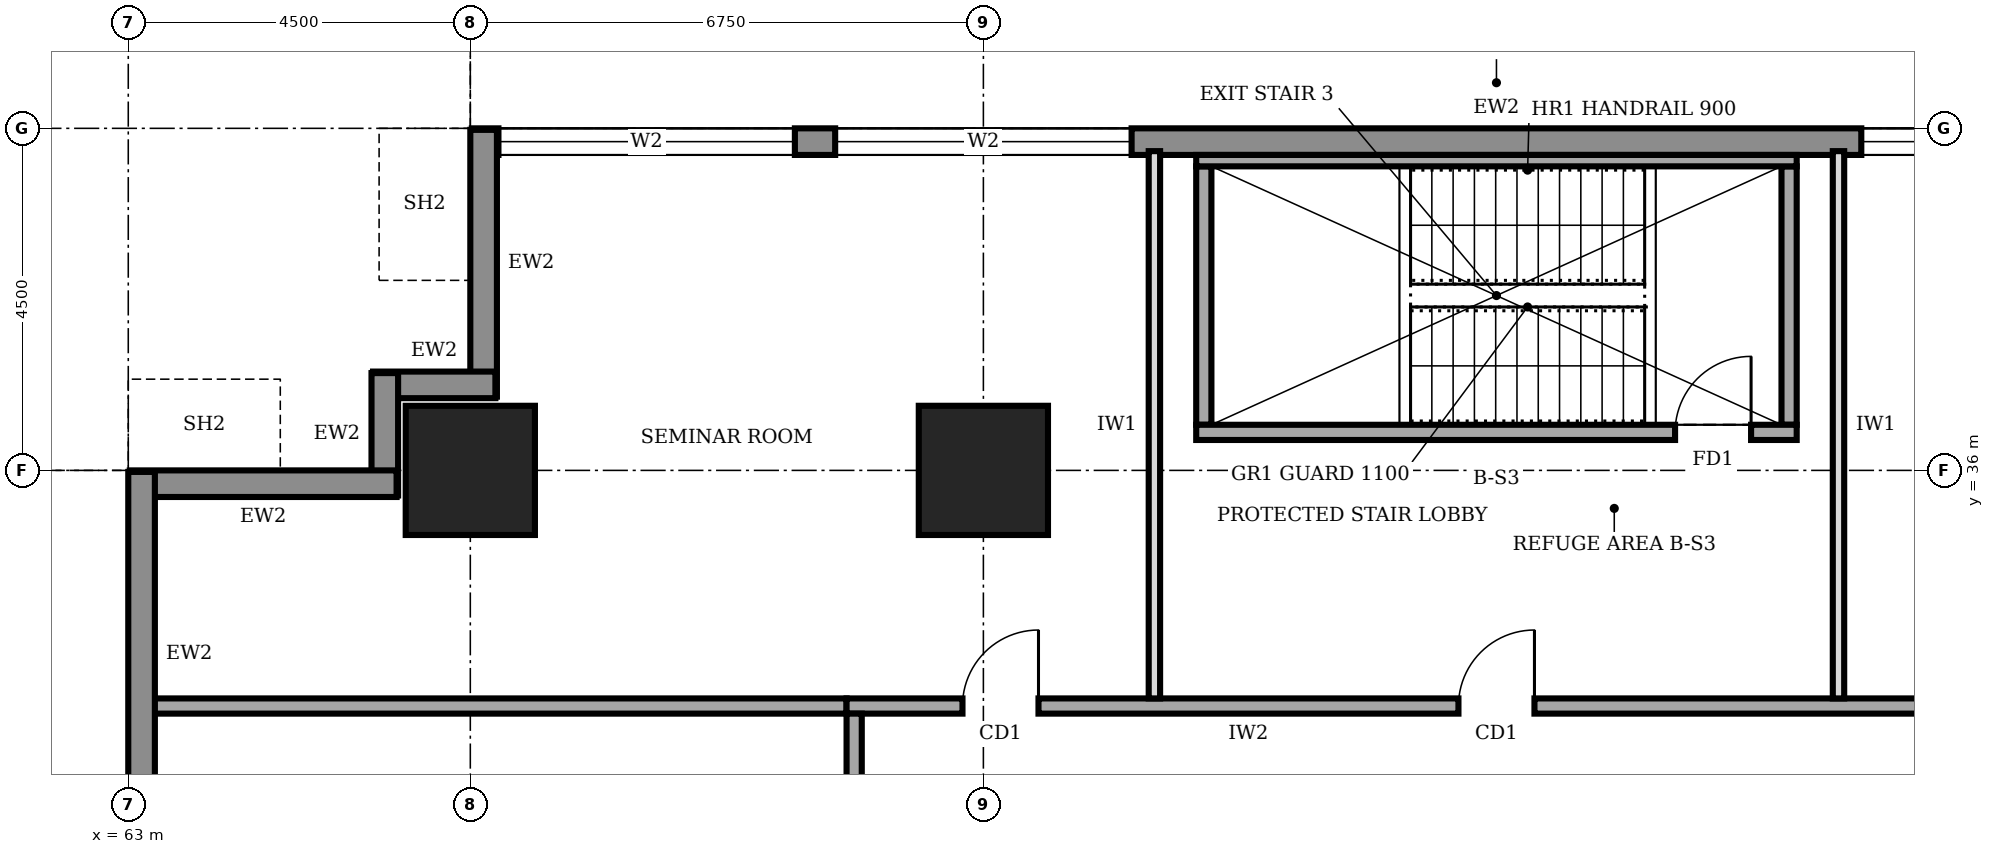
"""IFC4 building model, lengths in metres.
Left out: names, types, materials, properties, quantities, classifications, styles, units other than length and angle.
Written with IfcOpenShell. Run it as: python <this file> out.ifc"""

import sys

from ifc_helpers import new_model, si_unit, direction, frame, frame_2d, origin, origin_2d, place, context, subcontext, project, spatial, rectangle, extrude, element, fill, save


model = new_model("IFC4")
c1 = context("Model", 3, precision=1e-05, world=origin(), true_north=direction((0.0, 1.0)))
c2 = subcontext(c1, "Body", "Model", "MODEL_VIEW")
j1 = project(units=[si_unit("LENGTHUNIT", "METRE"), si_unit("PLANEANGLEUNIT", "RADIAN")], contexts=[c1])
p1 = place(None, origin())
s1 = spatial("IfcSite", under=j1, at=p1, CompositionType="ELEMENT")
p2 = place(p1, origin())
s2 = spatial("IfcBuilding", under=s1, at=p2, CompositionType="ELEMENT")
p3 = place(p2, frame((0.0, 0.0, 61.0)))
s3 = spatial("IfcBuildingStorey", under=s2, at=p3, CompositionType="ELEMENT", Elevation=61.0)
for number, where, z_axis, x_axis in (
    (1, (67.5, 36.0, 0.0), (0.0, 0.0, 1.0), (1.0, 0.0, 0.0)),
    (2, (74.25, 36.0, 0.0), (0.0, 0.0, 1.0), (1.0, 0.0, 0.0)),
):
    element("IfcColumn", number, at=place(p3, frame(where, z_axis=z_axis, x_axis=x_axis)), inside=s3, PredefinedType="COLUMN", context=c2, shape_type="SweptSolid", body=[
        extrude(rectangle(XDim=1.7, YDim=1.7, at=origin_2d()), origin(), (0.0, 0.0, 1.0), 4.0),
    ])
p4 = place(p3, frame((94.48, 40.325, 0.0), z_axis=(0.0, 0.0, 1.0), x_axis=(-1.0, 0.0, 0.0)))
e3 = element("IfcWall", 3, at=p4, inside=s3, PredefinedType="STANDARD", context=c2, shape_type="SweptSolid", body=[
    extrude(rectangle(XDim=26.96, YDim=0.35, at=frame_2d((13.48, 0.0))), origin(), (0.0, 0.0, 1.0), 3.75),
])
p5 = place(p4, frame((22.71, 0.0, 0.6)))
e4 = element("IfcOpeningElement", 4, at=p5, cuts=e3, PredefinedType="OPENING", context=c2, shape_type="SweptSolid", body=[
    extrude(rectangle(XDim=3.9, YDim=2.6, at=frame_2d((1.95, 1.3))), frame((0.0, 0.185, 0.0), z_axis=(0.0, -1.0, 0.0), x_axis=(1.0, 0.0, 0.0)), (0.0, 0.0, 1.0), 0.37),
])
p6 = place(p4, frame((18.28, 0.0, 0.6)))
e5 = element("IfcOpeningElement", 5, at=p6, cuts=e3, PredefinedType="OPENING", context=c2, shape_type="SweptSolid", body=[
    extrude(rectangle(XDim=3.9, YDim=2.6, at=frame_2d((1.95, 1.3))), frame((0.0, 0.185, 0.0), z_axis=(0.0, -1.0, 0.0), x_axis=(1.0, 0.0, 0.0)), (0.0, 0.0, 1.0), 0.37),
])
p7 = place(p4, frame((4.78, 0.0, 0.6)))
e6 = element("IfcOpeningElement", 6, at=p7, cuts=e3, PredefinedType="OPENING", context=c2, shape_type="SweptSolid", body=[
    extrude(rectangle(XDim=3.9, YDim=2.6, at=frame_2d((1.95, 1.3))), frame((0.0, 0.185, 0.0), z_axis=(0.0, -1.0, 0.0), x_axis=(1.0, 0.0, 0.0)), (0.0, 0.0, 1.0), 0.37),
])
p8 = place(p3, frame((67.675, 40.48, 0.0), z_axis=(0.0, 0.0, 1.0), x_axis=(0.0, -1.0, 0.0)))
e7 = element("IfcWall", 7, at=p8, inside=s3, PredefinedType="STANDARD", context=c2, shape_type="SweptSolid", body=[
    extrude(rectangle(XDim=3.51, YDim=0.35, at=frame_2d((1.755, 0.0))), origin(), (0.0, 0.0, 1.0), 2.85),
])
for number, where, z_axis, x_axis in (
    (8, (67.83, 37.125, 0.0), (0.0, 0.0, 1.0), (-1.0, 0.0, 0.0)),
    (9, (66.375, 37.28, 0.0), (0.0, 0.0, 1.0), (0.0, -1.0, 0.0)),
):
    element("IfcWall", number, at=place(p3, frame(where, z_axis=z_axis, x_axis=x_axis)), inside=s3, PredefinedType="STANDARD", context=c2, shape_type="SweptSolid", body=[
        extrude(rectangle(XDim=1.61, YDim=0.35, at=frame_2d((0.805, 0.0))), origin(), (0.0, 0.0, 1.0), 3.75),
    ])
p9 = place(p3, frame((66.53, 35.825, 0.0), z_axis=(0.0, 0.0, 1.0), x_axis=(-1.0, 0.0, 0.0)))
e10 = element("IfcWall", 10, at=p9, inside=s3, PredefinedType="STANDARD", context=c2, shape_type="SweptSolid", body=[
    extrude(rectangle(XDim=3.51, YDim=0.35, at=frame_2d((1.755, 0.0))), origin(), (0.0, 0.0, 1.0), 2.85),
])
p10 = place(p3, frame((63.175, 35.98, 0.0), z_axis=(0.0, 0.0, 1.0), x_axis=(0.0, -1.0, 0.0)))
e11 = element("IfcWall", 11, at=p10, inside=s3, PredefinedType="STANDARD", context=c2, shape_type="SweptSolid", body=[
    extrude(rectangle(XDim=31.46, YDim=0.35, at=frame_2d((15.73, 0.0))), origin(), (0.0, 0.0, 1.0), 3.75),
])
p11 = place(p10, frame((27.21, 0.0, 0.6)))
e12 = element("IfcOpeningElement", 12, at=p11, cuts=e11, PredefinedType="OPENING", context=c2, shape_type="SweptSolid", body=[
    extrude(rectangle(XDim=3.9, YDim=2.6, at=frame_2d((1.95, 1.3))), frame((0.0, 0.185, 0.0), z_axis=(0.0, -1.0, 0.0), x_axis=(1.0, 0.0, 0.0)), (0.0, 0.0, 1.0), 0.37),
])
p12 = place(p10, frame((22.78, 0.0, 0.6)))
e13 = element("IfcOpeningElement", 13, at=p12, cuts=e11, PredefinedType="OPENING", context=c2, shape_type="SweptSolid", body=[
    extrude(rectangle(XDim=3.9, YDim=2.6, at=frame_2d((1.95, 1.3))), frame((0.0, 0.185, 0.0), z_axis=(0.0, -1.0, 0.0), x_axis=(1.0, 0.0, 0.0)), (0.0, 0.0, 1.0), 0.37),
])
p13 = place(p10, frame((18.28, 0.0, 0.6)))
e14 = element("IfcOpeningElement", 14, at=p13, cuts=e11, PredefinedType="OPENING", context=c2, shape_type="SweptSolid", body=[
    extrude(rectangle(XDim=3.9, YDim=2.6, at=frame_2d((1.95, 1.3))), frame((0.0, 0.185, 0.0), z_axis=(0.0, -1.0, 0.0), x_axis=(1.0, 0.0, 0.0)), (0.0, 0.0, 1.0), 0.37),
])
p14 = place(p10, frame((13.78, 0.0, 0.6)))
e15 = element("IfcOpeningElement", 15, at=p14, cuts=e11, PredefinedType="OPENING", context=c2, shape_type="SweptSolid", body=[
    extrude(rectangle(XDim=3.9, YDim=2.6, at=frame_2d((1.95, 1.3))), frame((0.0, 0.185, 0.0), z_axis=(0.0, -1.0, 0.0), x_axis=(1.0, 0.0, 0.0)), (0.0, 0.0, 1.0), 0.37),
])
p15 = place(p10, frame((9.28, 0.0, 0.6)))
e16 = element("IfcOpeningElement", 16, at=p15, cuts=e11, PredefinedType="OPENING", context=c2, shape_type="SweptSolid", body=[
    extrude(rectangle(XDim=3.9, YDim=2.6, at=frame_2d((1.95, 1.3))), frame((0.0, 0.185, 0.0), z_axis=(0.0, -1.0, 0.0), x_axis=(1.0, 0.0, 0.0)), (0.0, 0.0, 1.0), 0.37),
])
p16 = place(p10, frame((4.78, 0.0, 0.6)))
e17 = element("IfcOpeningElement", 17, at=p16, cuts=e11, PredefinedType="OPENING", context=c2, shape_type="SweptSolid", body=[
    extrude(rectangle(XDim=3.9, YDim=2.6, at=frame_2d((1.95, 1.3))), frame((0.0, 0.185, 0.0), z_axis=(0.0, -1.0, 0.0), x_axis=(1.0, 0.0, 0.0)), (0.0, 0.0, 1.0), 0.37),
])
p17 = place(p3, frame((89.35, 32.9, 0.0), z_axis=(0.0, 0.0, 1.0), x_axis=(-1.0, 0.0, 0.0)))
e18 = element("IfcWall", 18, at=p17, inside=s3, PredefinedType="SOLIDWALL", context=c2, shape_type="SweptSolid", body=[
    extrude(rectangle(XDim=16.9, YDim=0.2, at=frame_2d((8.45, 0.0))), origin(), (0.0, 0.0, 1.0), 3.75),
])
p18 = place(p17, frame((14.375, 0.0, 0.0)))
e19 = element("IfcOpeningElement", 19, at=p18, cuts=e18, PredefinedType="OPENING", context=c2, shape_type="SweptSolid", body=[
    extrude(rectangle(XDim=1.0, YDim=2.1, at=frame_2d((0.5, 1.05))), frame((0.0, 0.11, 0.0), z_axis=(0.0, -1.0, 0.0), x_axis=(1.0, 0.0, 0.0)), (0.0, 0.0, 1.0), 0.22),
])
p19 = place(p17, frame((7.85, 0.0, 0.0)))
e20 = element("IfcOpeningElement", 20, at=p19, cuts=e18, PredefinedType="OPENING", context=c2, shape_type="SweptSolid", body=[
    extrude(rectangle(XDim=1.0, YDim=2.1, at=frame_2d((0.5, 1.05))), frame((0.0, 0.11, 0.0), z_axis=(0.0, -1.0, 0.0), x_axis=(1.0, 0.0, 0.0)), (0.0, 0.0, 1.0), 0.22),
])
p20 = place(p17, frame((1.325, 0.0, 0.0)))
e21 = element("IfcOpeningElement", 21, at=p20, cuts=e18, PredefinedType="OPENING", context=c2, shape_type="SweptSolid", body=[
    extrude(rectangle(XDim=1.0, YDim=2.1, at=frame_2d((0.5, 1.05))), frame((0.0, 0.11, 0.0), z_axis=(0.0, -1.0, 0.0), x_axis=(1.0, 0.0, 0.0)), (0.0, 0.0, 1.0), 0.22),
])
p21 = place(p3, frame((72.55, 32.8, 0.0), z_axis=(0.0, 0.0, 1.0), x_axis=(0.0, -1.0, 0.0)))
e22 = element("IfcWall", 22, at=p21, inside=s3, PredefinedType="SOLIDWALL", context=c2, shape_type="SweptSolid", body=[
    extrude(rectangle(XDim=25.3, YDim=0.2, at=frame_2d((12.65, 0.0))), origin(), (0.0, 0.0, 1.0), 3.75),
])
p22 = place(p21, frame((19.55, 0.0, 0.0)))
e23 = element("IfcOpeningElement", 23, at=p22, cuts=e22, PredefinedType="OPENING", context=c2, shape_type="SweptSolid", body=[
    extrude(rectangle(XDim=1.0, YDim=2.1, at=frame_2d((0.5, 1.05))), frame((0.0, 0.11, 0.0), z_axis=(0.0, -1.0, 0.0), x_axis=(1.0, 0.0, 0.0)), (0.0, 0.0, 1.0), 0.22),
])
p23 = place(p21, frame((6.4, 0.0, 0.0)))
e24 = element("IfcOpeningElement", 24, at=p23, cuts=e22, PredefinedType="OPENING", context=c2, shape_type="SweptSolid", body=[
    extrude(rectangle(XDim=1.8, YDim=2.1, at=frame_2d((0.9, 1.05))), frame((0.0, 0.11, 0.0), z_axis=(0.0, -1.0, 0.0), x_axis=(1.0, 0.0, 0.0)), (0.0, 0.0, 1.0), 0.22),
])
p24 = place(p3, frame((63.3, 32.9, 0.0), z_axis=(0.0, 0.0, 1.0), x_axis=(1.0, 0.0, 0.0)))
e25 = element("IfcWall", 25, at=p24, inside=s3, PredefinedType="SOLIDWALL", context=c2, shape_type="SweptSolid", body=[
    extrude(rectangle(XDim=9.15, YDim=0.2, at=frame_2d((4.575, 0.0))), origin(), (0.0, 0.0, 1.0), 3.75),
])
for number, where, z_axis, x_axis in (
    (26, (76.5, 33.0, 0.0), (0.0, 0.0, 1.0), (0.0, 1.0, 0.0)),
    (27, (85.5, 33.0, 0.0), (0.0, 0.0, 1.0), (0.0, 1.0, 0.0)),
):
    element("IfcWall", number, at=place(p3, frame(where, z_axis=z_axis, x_axis=x_axis)), inside=s3, PredefinedType="PARTITIONING", context=c2, shape_type="SweptSolid", body=[
        extrude(rectangle(XDim=7.2, YDim=0.15, at=frame_2d((3.6, 0.0))), origin(), (0.0, 0.0, 1.0), 3.75),
    ])
p25 = place(p3, frame((77.05, 36.5, 0.0), z_axis=(0.0, 0.0, 1.0), x_axis=(1.0, 0.0, 0.0)))
e28 = element("IfcWall", 28, at=p25, inside=s3, PredefinedType="SOLIDWALL", context=c2, shape_type="SweptSolid", body=[
    extrude(rectangle(XDim=7.9, YDim=0.2, at=frame_2d((3.95, 0.0))), origin(), (0.0, 0.0, 1.0), 3.75),
])
p26 = place(p25, frame((6.3, 0.0, 0.0)))
e29 = element("IfcOpeningElement", 29, at=p26, cuts=e28, PredefinedType="OPENING", context=c2, shape_type="SweptSolid", body=[
    extrude(rectangle(XDim=1.0, YDim=2.1, at=frame_2d((0.5, 1.05))), frame((0.0, 0.11, 0.0), z_axis=(0.0, -1.0, 0.0), x_axis=(1.0, 0.0, 0.0)), (0.0, 0.0, 1.0), 0.22),
])
p27 = place(p3, frame((77.05, 40.075, 0.0), z_axis=(0.0, 0.0, 1.0), x_axis=(1.0, 0.0, 0.0)))
e30 = element("IfcWall", 30, at=p27, inside=s3, PredefinedType="SOLIDWALL", context=c2, shape_type="SweptSolid", body=[
    extrude(rectangle(XDim=7.9, YDim=0.15, at=frame_2d((3.95, 0.0))), origin(), (0.0, 0.0, 1.0), 3.75),
])
for number, where, z_axis, x_axis in (
    (31, (77.15, 36.6, 0.0), (0.0, 0.0, 1.0), (0.0, 1.0, 0.0)),
    (32, (84.85, 36.6, 0.0), (0.0, 0.0, 1.0), (0.0, 1.0, 0.0)),
):
    element("IfcWall", number, at=place(p3, frame(where, z_axis=z_axis, x_axis=x_axis)), inside=s3, PredefinedType="SOLIDWALL", context=c2, shape_type="SweptSolid", body=[
        extrude(rectangle(XDim=3.4, YDim=0.2, at=frame_2d((1.7, 0.0))), origin(), (0.0, 0.0, 1.0), 3.75),
    ])
p28 = place(p5, origin())
e33 = element("IfcWindow", 33, at=p28, inside=s3, PartitioningType="SINGLE_PANEL", PredefinedType="WINDOW", context=c2, shape_type="SweptSolid", body=[
    extrude(rectangle(XDim=3.9, YDim=2.6, at=frame_2d((1.95, 1.3))), frame((0.0, 0.03, 0.0), z_axis=(0.0, -1.0, 0.0), x_axis=(1.0, 0.0, 0.0)), (0.0, 0.0, 1.0), 0.06),
])
fill(e4, e33)
p29 = place(p6, origin())
e34 = element("IfcWindow", 34, at=p29, inside=s3, PartitioningType="SINGLE_PANEL", PredefinedType="WINDOW", context=c2, shape_type="SweptSolid", body=[
    extrude(rectangle(XDim=3.9, YDim=2.6, at=frame_2d((1.95, 1.3))), frame((0.0, 0.03, 0.0), z_axis=(0.0, -1.0, 0.0), x_axis=(1.0, 0.0, 0.0)), (0.0, 0.0, 1.0), 0.06),
])
fill(e5, e34)
p30 = place(p7, origin())
e35 = element("IfcWindow", 35, at=p30, inside=s3, PartitioningType="SINGLE_PANEL", PredefinedType="WINDOW", context=c2, shape_type="SweptSolid", body=[
    extrude(rectangle(XDim=3.9, YDim=2.6, at=frame_2d((1.95, 1.3))), frame((0.0, 0.03, 0.0), z_axis=(0.0, -1.0, 0.0), x_axis=(1.0, 0.0, 0.0)), (0.0, 0.0, 1.0), 0.06),
])
fill(e6, e35)
p31 = place(p18, frame((1.0, 0.0, 0.0), z_axis=(0.0, 0.0, 1.0), x_axis=(-1.0, 0.0, 0.0)))
e36 = element("IfcDoor", 36, at=p31, inside=s3, OperationType="SINGLE_SWING_RIGHT", PredefinedType="DOOR", context=c2, shape_type="SweptSolid", body=[
    extrude(rectangle(XDim=1.0, YDim=2.1, at=frame_2d((0.5, 1.05))), frame((0.0, 0.025, 0.0), z_axis=(0.0, -1.0, 0.0), x_axis=(1.0, 0.0, 0.0)), (0.0, 0.0, 1.0), 0.05),
])
fill(e19, e36)
p32 = place(p19, frame((1.0, 0.0, 0.0), z_axis=(0.0, 0.0, 1.0), x_axis=(-1.0, 0.0, 0.0)))
e37 = element("IfcDoor", 37, at=p32, inside=s3, OperationType="SINGLE_SWING_RIGHT", PredefinedType="DOOR", context=c2, shape_type="SweptSolid", body=[
    extrude(rectangle(XDim=1.0, YDim=2.1, at=frame_2d((0.5, 1.05))), frame((0.0, 0.025, 0.0), z_axis=(0.0, -1.0, 0.0), x_axis=(1.0, 0.0, 0.0)), (0.0, 0.0, 1.0), 0.05),
])
fill(e20, e37)
p33 = place(p26, origin())
e38 = element("IfcDoor", 38, at=p33, inside=s3, OperationType="SINGLE_SWING_RIGHT", PredefinedType="DOOR", context=c2, shape_type="SweptSolid", body=[
    extrude(rectangle(XDim=1.0, YDim=2.1, at=frame_2d((0.5, 1.05))), frame((0.0, 0.025, 0.0), z_axis=(0.0, -1.0, 0.0), x_axis=(1.0, 0.0, 0.0)), (0.0, 0.0, 1.0), 0.05),
])
fill(e29, e38)
save(model, sys.argv[1])
